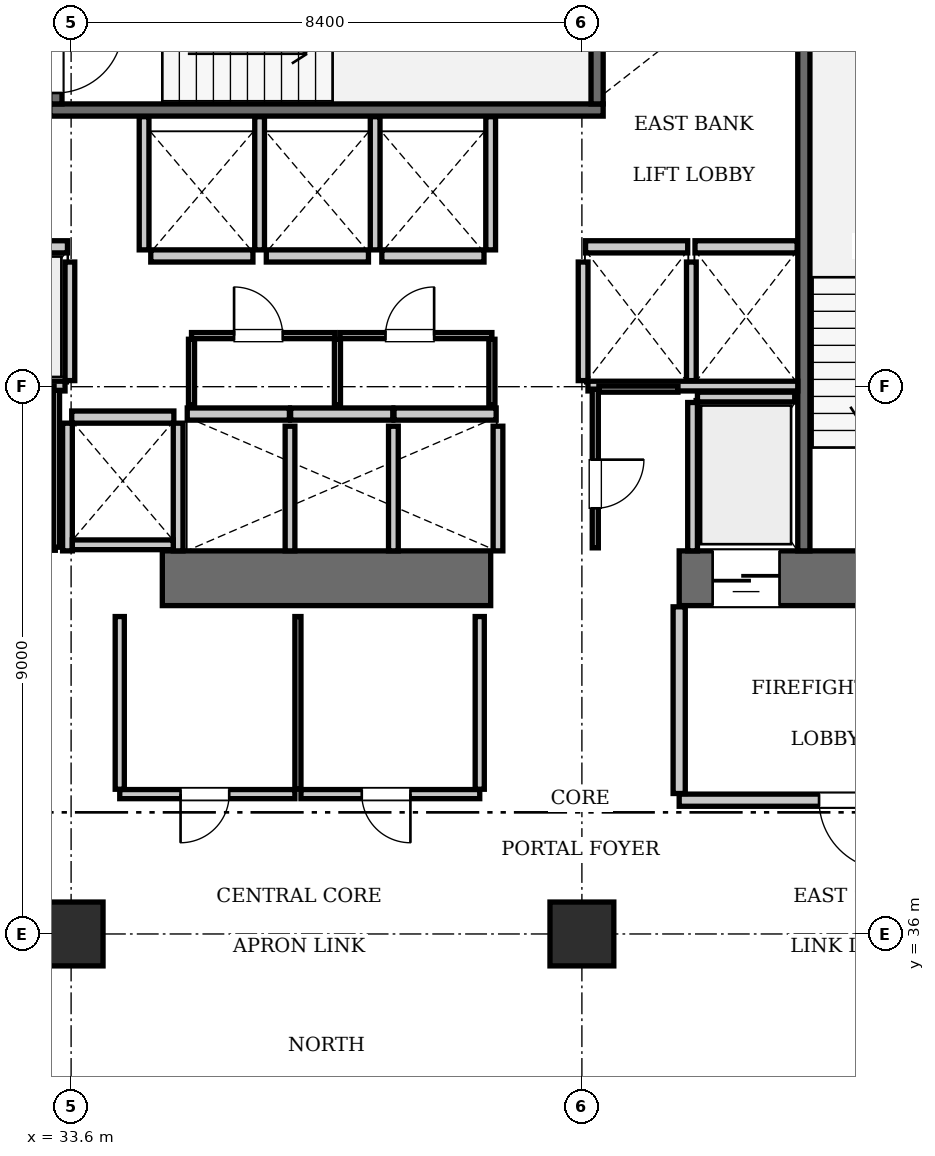
"""IFC4 building model, lengths in metres.
Left out: names, types, materials, properties, quantities, classifications, styles, units other than length and angle.
Written with IfcOpenShell. Run it as: python <this file> out.ifc"""

import sys

from ifc_helpers import new_model, si_unit, direction, frame, frame_2d, origin, origin_2d, place, context, subcontext, project, spatial, rectangle, extrude, element, fill, save


model = new_model("IFC4")
c1 = context("Model", 3, precision=1e-05, world=origin(), true_north=direction((0.0, 1.0)))
c2 = subcontext(c1, "Body", "Model", "MODEL_VIEW")
j1 = project(units=[si_unit("LENGTHUNIT", "METRE"), si_unit("PLANEANGLEUNIT", "RADIAN")], contexts=[c1])
p1 = place(None, origin())
s1 = spatial("IfcSite", under=j1, at=p1, CompositionType="ELEMENT")
p2 = place(p1, origin())
s2 = spatial("IfcBuilding", under=s1, at=p2, CompositionType="ELEMENT")
p3 = place(p2, frame((0.0, 0.0, 107.8)))
s3 = spatial("IfcBuildingStorey", under=s2, at=p3, CompositionType="ELEMENT", Elevation=107.8)
p4 = place(p3, frame((35.1, 41.85, 0.0), z_axis=(0.0, 0.0, 1.0), x_axis=(1.0, 0.0, 0.0)))
e1 = element("IfcWall", 1, at=p4, inside=s3, PredefinedType="SHEAR", context=c2, shape_type="SweptSolid", body=[
    extrude(rectangle(XDim=5.4, YDim=0.9, at=frame_2d((2.7, 0.0))), origin(), (0.0, 0.0, 1.0), 3.85),
])
p5 = place(p3, frame((43.6, 41.85, 0.0), z_axis=(0.0, 0.0, 1.0), x_axis=(1.0, 0.0, 0.0)))
e2 = element("IfcWall", 2, at=p5, inside=s3, PredefinedType="SHEAR", context=c2, shape_type="SweptSolid", body=[
    extrude(rectangle(XDim=6.8, YDim=0.9, at=frame_2d((3.4, 0.0))), origin(), (0.0, 0.0, 1.0), 3.85),
])
p6 = place(p5, frame((3.9, 0.0, 0.0)))
e3 = element("IfcOpeningElement", 3, at=p6, cuts=e2, PredefinedType="OPENING", context=c2, shape_type="SweptSolid", body=[
    extrude(rectangle(XDim=1.15, YDim=2.15, at=frame_2d((0.575, 1.075))), frame((0.0, 0.46, 0.0), z_axis=(0.0, -1.0, 0.0), x_axis=(1.0, 0.0, 0.0)), (0.0, 0.0, 1.0), 0.92),
])
p7 = place(p5, frame((0.55, 0.0, 0.0)))
e4 = element("IfcOpeningElement", 4, at=p7, cuts=e2, PredefinedType="OPENING", context=c2, shape_type="SweptSolid", body=[
    extrude(rectangle(XDim=1.1, YDim=2.2, at=frame_2d((0.55, 1.1))), frame((0.0, 0.46, 0.0), z_axis=(0.0, -1.0, 0.0), x_axis=(1.0, 0.0, 0.0)), (0.0, 0.0, 1.0), 0.92),
])
for number, where, z_axis, x_axis in (
    (5, (33.6, 36.0, 0.0), (0.0, 0.0, 1.0), (1.0, 0.0, 0.0)),
    (6, (42.0, 36.0, 0.0), (0.0, 0.0, 1.0), (1.0, 0.0, 0.0)),
):
    element("IfcColumn", number, at=place(p3, frame(where, z_axis=z_axis, x_axis=x_axis)), inside=s3, PredefinedType="COLUMN", context=c2, shape_type="SweptSolid", body=[
        extrude(rectangle(XDim=1.05, YDim=1.05, at=origin_2d()), origin(), (0.0, 0.0, 1.0), 3.85),
    ])
p8 = place(p3, frame((33.25, 49.55, 0.0), z_axis=(0.0, 0.0, 1.0), x_axis=(1.0, 0.0, 0.0)))
e7 = element("IfcWall", 7, at=p8, inside=s3, PredefinedType="SOLIDWALL", context=c2, shape_type="SweptSolid", body=[
    extrude(rectangle(XDim=9.1, YDim=0.2, at=frame_2d((4.55, 0.0))), origin(), (0.0, 0.0, 1.0), 3.61),
])
p9 = place(p3, frame((42.25, 49.65, 0.0), z_axis=(0.0, 0.0, 1.0), x_axis=(0.0, 1.0, 0.0)))
e8 = element("IfcWall", 8, at=p9, inside=s3, PredefinedType="SOLIDWALL", context=c2, shape_type="SweptSolid", body=[
    extrude(rectangle(XDim=3.45, YDim=0.2, at=frame_2d((1.725, 0.0))), origin(), (0.0, 0.0, 1.0), 3.61),
])
p10 = place(p3, frame((33.35, 49.65, 0.0), z_axis=(0.0, 0.0, 1.0), x_axis=(0.0, 1.0, 0.0)))
e9 = element("IfcWall", 9, at=p10, inside=s3, PredefinedType="SOLIDWALL", context=c2, shape_type="SweptSolid", body=[
    extrude(rectangle(XDim=3.45, YDim=0.2, at=frame_2d((1.725, 0.0))), origin(), (0.0, 0.0, 1.0), 3.61),
])
p11 = place(p10, frame((0.18, 0.0, 0.0)))
e10 = element("IfcOpeningElement", 10, at=p11, cuts=e9, PredefinedType="OPENING", context=c2, shape_type="SweptSolid", body=[
    extrude(rectangle(XDim=1.1, YDim=2.15, at=frame_2d((0.55, 1.075))), frame((0.0, 0.11, 0.0), z_axis=(0.0, -1.0, 0.0), x_axis=(1.0, 0.0, 0.0)), (0.0, 0.0, 1.0), 0.22),
])
p12 = place(p3, frame((45.65, 42.3, 0.0), z_axis=(0.0, 0.0, 1.0), x_axis=(0.0, 1.0, 0.0)))
e11 = element("IfcWall", 11, at=p12, inside=s3, PredefinedType="SOLIDWALL", context=c2, shape_type="SweptSolid", body=[
    extrude(rectangle(XDim=8.85, YDim=0.2, at=frame_2d((4.425, 0.0))), origin(), (0.0, 0.0, 1.0), 3.61),
])
p13 = place(p3, frame((31.86, 47.3, 0.0), z_axis=(0.0, 0.0, 1.0), x_axis=(1.0, 0.0, 0.0)))
e12 = element("IfcWall", 12, at=p13, inside=s3, PredefinedType="SOLIDWALL", context=c2, shape_type="SweptSolid", body=[
    extrude(rectangle(XDim=1.68, YDim=0.2, at=frame_2d((0.84, 0.0))), origin(), (0.0, 0.0, 1.0), 3.61),
])
p14 = place(p13, frame((0.34, 0.0, 0.0)))
e13 = element("IfcOpeningElement", 13, at=p14, cuts=e12, PredefinedType="OPENING", context=c2, shape_type="SweptSolid", body=[
    extrude(rectangle(XDim=1.0, YDim=2.15, at=frame_2d((0.5, 1.075))), frame((0.0, 0.11, 0.0), z_axis=(0.0, -1.0, 0.0), x_axis=(1.0, 0.0, 0.0)), (0.0, 0.0, 1.0), 0.22),
])
for number, where, z_axis, x_axis in (
    (14, (42.06, 47.3, 0.0), (0.0, 0.0, 1.0), (1.0, 0.0, 0.0)),
    (15, (43.86, 47.3, 0.0), (0.0, 0.0, 1.0), (1.0, 0.0, 0.0)),
    (16, (35.51, 44.55, 0.0), (0.0, 0.0, 1.0), (1.0, 0.0, 0.0)),
    (17, (37.21, 44.55, 0.0), (0.0, 0.0, 1.0), (1.0, 0.0, 0.0)),
):
    element("IfcWall", number, at=place(p3, frame(where, z_axis=z_axis, x_axis=x_axis)), inside=s3, PredefinedType="SOLIDWALL", context=c2, shape_type="SweptSolid", body=[
        extrude(rectangle(XDim=1.68, YDim=0.2, at=frame_2d((0.84, 0.0))), origin(), (0.0, 0.0, 1.0), 3.61),
    ])
for number, where, z_axis, x_axis in (
    (18, (38.91, 44.55, 0.0), (0.0, 0.0, 1.0), (1.0, 0.0, 0.0)),
    (19, (34.91, 47.15, 0.0), (0.0, 0.0, 1.0), (1.0, 0.0, 0.0)),
):
    element("IfcWall", number, at=place(p3, frame(where, z_axis=z_axis, x_axis=x_axis)), inside=s3, PredefinedType="SOLIDWALL", context=c2, shape_type="SweptSolid", body=[
        extrude(rectangle(XDim=1.68, YDim=0.2, at=frame_2d((0.84, 0.0))), origin(), (0.0, 0.0, 1.0), 3.61),
    ])
for number, where, z_axis, x_axis in (
    (20, (36.81, 47.15, 0.0), (0.0, 0.0, 1.0), (1.0, 0.0, 0.0)),
    (21, (38.71, 47.15, 0.0), (0.0, 0.0, 1.0), (1.0, 0.0, 0.0)),
    (22, (33.61, 44.5, 0.0), (0.0, 0.0, 1.0), (1.0, 0.0, 0.0)),
):
    element("IfcWall", number, at=place(p3, frame(where, z_axis=z_axis, x_axis=x_axis)), inside=s3, PredefinedType="SOLIDWALL", context=c2, shape_type="SweptSolid", body=[
        extrude(rectangle(XDim=1.68, YDim=0.2, at=frame_2d((0.84, 0.0))), origin(), (0.0, 0.0, 1.0), 3.61),
    ])
p15 = place(p3, frame((43.9, 44.83, 0.0), z_axis=(0.0, 0.0, 1.0), x_axis=(1.0, 0.0, 0.0)))
e23 = element("IfcWall", 23, at=p15, inside=s3, PredefinedType="SOLIDWALL", context=c2, shape_type="SweptSolid", body=[
    extrude(rectangle(XDim=1.6, YDim=0.16, at=frame_2d((0.8, 0.0))), origin(), (0.0, 0.0, 1.0), 3.61),
])
p16 = place(p3, frame((43.82, 42.3, 0.0), z_axis=(0.0, 0.0, 1.0), x_axis=(0.0, 1.0, 0.0)))
e24 = element("IfcWall", 24, at=p16, inside=s3, PredefinedType="SOLIDWALL", context=c2, shape_type="SweptSolid", body=[
    extrude(rectangle(XDim=2.44, YDim=0.16, at=frame_2d((1.22, 0.0))), origin(), (0.0, 0.0, 1.0), 3.61),
])
p17 = place(p3, frame((33.58, 45.1, 0.0), z_axis=(0.0, 0.0, 1.0), x_axis=(0.0, 1.0, 0.0)))
e25 = element("IfcWall", 25, at=p17, inside=s3, PredefinedType="SOLIDWALL", context=c2, shape_type="SweptSolid", body=[
    extrude(rectangle(XDim=1.95, YDim=0.16, at=frame_2d((0.975, 0.0))), origin(), (0.0, 0.0, 1.0), 3.61),
])
p18 = place(p3, frame((30.05, 45.01, 0.0), z_axis=(0.0, 0.0, 1.0), x_axis=(1.0, 0.0, 0.0)))
e26 = element("IfcWall", 26, at=p18, inside=s3, PredefinedType="SOLIDWALL", context=c2, shape_type="SweptSolid", body=[
    extrude(rectangle(XDim=3.45, YDim=0.16, at=frame_2d((1.725, 0.0))), origin(), (0.0, 0.0, 1.0), 3.61),
])
for number, where, z_axis, x_axis in (
    (27, (42.02, 45.1, 0.0), (0.0, 0.0, 1.0), (0.0, 1.0, 0.0)),
    (28, (43.8, 45.1, 0.0), (0.0, 0.0, 1.0), (0.0, 1.0, 0.0)),
):
    element("IfcWall", number, at=place(p3, frame(where, z_axis=z_axis, x_axis=x_axis)), inside=s3, PredefinedType="SOLIDWALL", context=c2, shape_type="SweptSolid", body=[
        extrude(rectangle(XDim=1.95, YDim=0.16, at=frame_2d((0.975, 0.0))), origin(), (0.0, 0.0, 1.0), 3.61),
    ])
p19 = place(p3, frame((42.1, 45.01, 0.0), z_axis=(0.0, 0.0, 1.0), x_axis=(1.0, 0.0, 0.0)))
e29 = element("IfcWall", 29, at=p19, inside=s3, PredefinedType="SOLIDWALL", context=c2, shape_type="SweptSolid", body=[
    extrude(rectangle(XDim=3.45, YDim=0.16, at=frame_2d((1.725, 0.0))), origin(), (0.0, 0.0, 1.0), 3.61),
])
for number, where, z_axis, x_axis in (
    (30, (37.2, 42.3, 0.0), (0.0, 0.0, 1.0), (0.0, 1.0, 0.0)),
    (31, (38.9, 42.3, 0.0), (0.0, 0.0, 1.0), (0.0, 1.0, 0.0)),
    (32, (40.62, 42.3, 0.0), (0.0, 0.0, 1.0), (0.0, 1.0, 0.0)),
):
    element("IfcWall", number, at=place(p3, frame(where, z_axis=z_axis, x_axis=x_axis)), inside=s3, PredefinedType="SOLIDWALL", context=c2, shape_type="SweptSolid", body=[
        extrude(rectangle(XDim=2.05, YDim=0.16, at=frame_2d((1.025, 0.0))), origin(), (0.0, 0.0, 1.0), 3.61),
    ])
for number, where, z_axis, x_axis in (
    (33, (34.8, 47.25, 0.0), (0.0, 0.0, 1.0), (0.0, 1.0, 0.0)),
    (34, (36.7, 47.25, 0.0), (0.0, 0.0, 1.0), (0.0, 1.0, 0.0)),
    (35, (38.6, 47.25, 0.0), (0.0, 0.0, 1.0), (0.0, 1.0, 0.0)),
    (36, (40.5, 47.25, 0.0), (0.0, 0.0, 1.0), (0.0, 1.0, 0.0)),
):
    element("IfcWall", number, at=place(p3, frame(where, z_axis=z_axis, x_axis=x_axis)), inside=s3, PredefinedType="SOLIDWALL", context=c2, shape_type="SweptSolid", body=[
        extrude(rectangle(XDim=2.19, YDim=0.16, at=frame_2d((1.095, 0.0))), origin(), (0.0, 0.0, 1.0), 3.61),
    ])
for number, where, z_axis, x_axis in (
    (37, (33.54, 42.3, 0.0), (0.0, 0.0, 1.0), (0.0, 1.0, 0.0)),
    (38, (35.36, 42.3, 0.0), (0.0, 0.0, 1.0), (0.0, 1.0, 0.0)),
):
    element("IfcWall", number, at=place(p3, frame(where, z_axis=z_axis, x_axis=x_axis)), inside=s3, PredefinedType="SOLIDWALL", context=c2, shape_type="SweptSolid", body=[
        extrude(rectangle(XDim=2.1, YDim=0.16, at=frame_2d((1.05, 0.0))), origin(), (0.0, 0.0, 1.0), 3.61),
    ])
p20 = place(p3, frame((33.62, 42.4, 0.0), z_axis=(0.0, 0.0, 1.0), x_axis=(1.0, 0.0, 0.0)))
e39 = element("IfcWall", 39, at=p20, inside=s3, PredefinedType="SOLIDWALL", context=c2, shape_type="SweptSolid", body=[
    extrude(rectangle(XDim=1.66, YDim=0.16, at=frame_2d((0.83, 0.0))), origin(), (0.0, 0.0, 1.0), 3.61),
])
p21 = place(p3, frame((43.6, 38.2, 0.0), z_axis=(0.0, 0.0, 1.0), x_axis=(1.0, 0.0, 0.0)))
e40 = element("IfcWall", 40, at=p21, inside=s3, PredefinedType="PARTITIONING", context=c2, shape_type="SweptSolid", body=[
    extrude(rectangle(XDim=5.8, YDim=0.2, at=frame_2d((2.9, 0.0))), origin(), (0.0, 0.0, 1.0), 3.61),
])
p22 = place(p21, frame((2.3, 0.0, 0.0)))
e41 = element("IfcOpeningElement", 41, at=p22, cuts=e40, PredefinedType="OPENING", context=c2, shape_type="SweptSolid", body=[
    extrude(rectangle(XDim=1.15, YDim=2.15, at=frame_2d((0.575, 1.075))), frame((0.0, 0.11, 0.0), z_axis=(0.0, -1.0, 0.0), x_axis=(1.0, 0.0, 0.0)), (0.0, 0.0, 1.0), 0.22),
])
p23 = place(p3, frame((43.6, 38.31, 0.0), z_axis=(0.0, 0.0, 1.0), x_axis=(0.0, 1.0, 0.0)))
e42 = element("IfcWall", 42, at=p23, inside=s3, PredefinedType="PARTITIONING", context=c2, shape_type="SweptSolid", body=[
    extrude(rectangle(XDim=3.07, YDim=0.2, at=frame_2d((1.535, 0.0))), origin(), (0.0, 0.0, 1.0), 3.61),
])
p24 = place(p3, frame((32.02, 42.36, 0.0), z_axis=(0.0, 0.0, 1.0), x_axis=(1.0, 0.0, 0.0)))
e43 = element("IfcWall", 43, at=p24, inside=s3, PredefinedType="PARTITIONING", context=c2, shape_type="SweptSolid", body=[
    extrude(rectangle(XDim=1.32, YDim=0.1, at=frame_2d((0.66, 0.0))), origin(), (0.0, 0.0, 1.0), 3.61),
])
p25 = place(p24, frame((0.24, 0.0, 0.0)))
e44 = element("IfcOpeningElement", 44, at=p25, cuts=e43, PredefinedType="OPENING", context=c2, shape_type="SweptSolid", body=[
    extrude(rectangle(XDim=0.8, YDim=2.05, at=frame_2d((0.4, 1.025))), frame((0.0, 0.06, 0.0), z_axis=(0.0, -1.0, 0.0), x_axis=(1.0, 0.0, 0.0)), (0.0, 0.0, 1.0), 0.12),
])
p26 = place(p3, frame((31.84, 44.96, 0.0), z_axis=(0.0, 0.0, 1.0), x_axis=(1.0, 0.0, 0.0)))
e45 = element("IfcWall", 45, at=p26, inside=s3, PredefinedType="PARTITIONING", context=c2, shape_type="SweptSolid", body=[
    extrude(rectangle(XDim=1.48, YDim=0.1, at=frame_2d((0.74, 0.0))), origin(), (0.0, 0.0, 1.0), 3.61),
])
p27 = place(p3, frame((33.36, 42.36, 0.0), z_axis=(0.0, 0.0, 1.0), x_axis=(0.0, 1.0, 0.0)))
e46 = element("IfcWall", 46, at=p27, inside=s3, PredefinedType="PARTITIONING", context=c2, shape_type="SweptSolid", body=[
    extrude(rectangle(XDim=2.58, YDim=0.1, at=frame_2d((1.29, 0.0))), origin(), (0.0, 0.0, 1.0), 3.61),
])
p28 = place(p3, frame((35.58, 45.84, 0.0), z_axis=(0.0, 0.0, 1.0), x_axis=(1.0, 0.0, 0.0)))
e47 = element("IfcWall", 47, at=p28, inside=s3, PredefinedType="PARTITIONING", context=c2, shape_type="SweptSolid", body=[
    extrude(rectangle(XDim=2.36, YDim=0.1, at=frame_2d((1.18, 0.0))), origin(), (0.0, 0.0, 1.0), 3.61),
])
p29 = place(p28, frame((0.7, 0.0, 0.0)))
e48 = element("IfcOpeningElement", 48, at=p29, cuts=e47, PredefinedType="OPENING", context=c2, shape_type="SweptSolid", body=[
    extrude(rectangle(XDim=0.8, YDim=2.05, at=frame_2d((0.4, 1.025))), frame((0.0, 0.06, 0.0), z_axis=(0.0, -1.0, 0.0), x_axis=(1.0, 0.0, 0.0)), (0.0, 0.0, 1.0), 0.12),
])
p30 = place(p3, frame((38.02, 45.84, 0.0), z_axis=(0.0, 0.0, 1.0), x_axis=(1.0, 0.0, 0.0)))
e49 = element("IfcWall", 49, at=p30, inside=s3, PredefinedType="PARTITIONING", context=c2, shape_type="SweptSolid", body=[
    extrude(rectangle(XDim=2.5, YDim=0.1, at=frame_2d((1.25, 0.0))), origin(), (0.0, 0.0, 1.0), 3.61),
])
p31 = place(p30, frame((0.75, 0.0, 0.0)))
e50 = element("IfcOpeningElement", 50, at=p31, cuts=e49, PredefinedType="OPENING", context=c2, shape_type="SweptSolid", body=[
    extrude(rectangle(XDim=0.8, YDim=2.05, at=frame_2d((0.4, 1.025))), frame((0.0, 0.06, 0.0), z_axis=(0.0, -1.0, 0.0), x_axis=(1.0, 0.0, 0.0)), (0.0, 0.0, 1.0), 0.12),
])
for number, where, z_axis, x_axis in (
    (51, (35.58, 44.7, 0.0), (0.0, 0.0, 1.0), (0.0, 1.0, 0.0)),
    (52, (37.98, 44.7, 0.0), (0.0, 0.0, 1.0), (0.0, 1.0, 0.0)),
    (53, (40.52, 44.7, 0.0), (0.0, 0.0, 1.0), (0.0, 1.0, 0.0)),
):
    element("IfcWall", number, at=place(p3, frame(where, z_axis=z_axis, x_axis=x_axis)), inside=s3, PredefinedType="PARTITIONING", context=c2, shape_type="SweptSolid", body=[
        extrude(rectangle(XDim=1.08, YDim=0.1, at=frame_2d((0.54, 0.0))), origin(), (0.0, 0.0, 1.0), 3.61),
    ])
p32 = place(p3, frame((42.22, 42.35, 0.0), z_axis=(0.0, 0.0, 1.0), x_axis=(0.0, 1.0, 0.0)))
e54 = element("IfcWall", 54, at=p32, inside=s3, PredefinedType="PARTITIONING", context=c2, shape_type="SweptSolid", body=[
    extrude(rectangle(XDim=2.61, YDim=0.1, at=frame_2d((1.305, 0.0))), origin(), (0.0, 0.0, 1.0), 3.61),
])
p33 = place(p32, frame((0.65, 0.0, 0.0)))
e55 = element("IfcOpeningElement", 55, at=p33, cuts=e54, PredefinedType="OPENING", context=c2, shape_type="SweptSolid", body=[
    extrude(rectangle(XDim=0.8, YDim=2.05, at=frame_2d((0.4, 1.025))), frame((0.0, 0.06, 0.0), z_axis=(0.0, -1.0, 0.0), x_axis=(1.0, 0.0, 0.0)), (0.0, 0.0, 1.0), 0.12),
])
p34 = place(p3, frame((42.28, 44.96, 0.0), z_axis=(0.0, 0.0, 1.0), x_axis=(1.0, 0.0, 0.0)))
e56 = element("IfcWall", 56, at=p34, inside=s3, PredefinedType="PARTITIONING", context=c2, shape_type="SweptSolid", body=[
    extrude(rectangle(XDim=1.3, YDim=0.1, at=frame_2d((0.65, 0.0))), origin(), (0.0, 0.0, 1.0), 3.61),
])
p35 = place(p3, frame((34.4, 38.3, 0.0), z_axis=(0.0, 0.0, 1.0), x_axis=(1.0, 0.0, 0.0)))
e57 = element("IfcWall", 57, at=p35, inside=s3, PredefinedType="PARTITIONING", context=c2, shape_type="SweptSolid", body=[
    extrude(rectangle(XDim=2.88, YDim=0.15, at=frame_2d((1.44, 0.0))), origin(), (0.0, 0.0, 1.0), 3.61),
])
p36 = place(p35, frame((1.0, 0.0, 0.0)))
e58 = element("IfcOpeningElement", 58, at=p36, cuts=e57, PredefinedType="OPENING", context=c2, shape_type="SweptSolid", body=[
    extrude(rectangle(XDim=0.8, YDim=2.05, at=frame_2d((0.4, 1.025))), frame((0.0, 0.085, 0.0), z_axis=(0.0, -1.0, 0.0), x_axis=(1.0, 0.0, 0.0)), (0.0, 0.0, 1.0), 0.17),
])
p37 = place(p3, frame((37.38, 38.3, 0.0), z_axis=(0.0, 0.0, 1.0), x_axis=(1.0, 0.0, 0.0)))
e59 = element("IfcWall", 59, at=p37, inside=s3, PredefinedType="PARTITIONING", context=c2, shape_type="SweptSolid", body=[
    extrude(rectangle(XDim=2.94, YDim=0.15, at=frame_2d((1.47, 0.0))), origin(), (0.0, 0.0, 1.0), 3.61),
])
p38 = place(p37, frame((1.0, 0.0, 0.0)))
e60 = element("IfcOpeningElement", 60, at=p38, cuts=e59, PredefinedType="OPENING", context=c2, shape_type="SweptSolid", body=[
    extrude(rectangle(XDim=0.8, YDim=2.05, at=frame_2d((0.4, 1.025))), frame((0.0, 0.085, 0.0), z_axis=(0.0, -1.0, 0.0), x_axis=(1.0, 0.0, 0.0)), (0.0, 0.0, 1.0), 0.17),
])
p39 = place(p3, frame((34.4, 38.38, 0.0), z_axis=(0.0, 0.0, 1.0), x_axis=(0.0, 1.0, 0.0)))
e61 = element("IfcWall", 61, at=p39, inside=s3, PredefinedType="PARTITIONING", context=c2, shape_type="SweptSolid", body=[
    extrude(rectangle(XDim=2.84, YDim=0.15, at=frame_2d((1.42, 0.0))), origin(), (0.0, 0.0, 1.0), 3.61),
])
p40 = place(p3, frame((37.33, 38.38, 0.0), z_axis=(0.0, 0.0, 1.0), x_axis=(0.0, 1.0, 0.0)))
e62 = element("IfcWall", 62, at=p40, inside=s3, PredefinedType="PARTITIONING", context=c2, shape_type="SweptSolid", body=[
    extrude(rectangle(XDim=2.84, YDim=0.1, at=frame_2d((1.42, 0.0))), origin(), (0.0, 0.0, 1.0), 3.61),
])
p41 = place(p3, frame((40.32, 38.38, 0.0), z_axis=(0.0, 0.0, 1.0), x_axis=(0.0, 1.0, 0.0)))
e63 = element("IfcWall", 63, at=p41, inside=s3, PredefinedType="PARTITIONING", context=c2, shape_type="SweptSolid", body=[
    extrude(rectangle(XDim=2.84, YDim=0.15, at=frame_2d((1.42, 0.0))), origin(), (0.0, 0.0, 1.0), 3.61),
])
p42 = place(p11, frame((1.1, 0.0, 0.0), z_axis=(0.0, 0.0, 1.0), x_axis=(-1.0, 0.0, 0.0)))
e64 = element("IfcDoor", 64, at=p42, inside=s3, OperationType="SINGLE_SWING_LEFT", PredefinedType="DOOR", context=c2, shape_type="SweptSolid", body=[
    extrude(rectangle(XDim=1.1, YDim=2.15, at=frame_2d((0.55, 1.075))), frame((0.0, 0.025, 0.0), z_axis=(0.0, -1.0, 0.0), x_axis=(1.0, 0.0, 0.0)), (0.0, 0.0, 1.0), 0.05),
])
fill(e10, e64)
p43 = place(p7, frame((1.1, 0.0, 0.0), z_axis=(0.0, 0.0, 1.0), x_axis=(-1.0, 0.0, 0.0)))
e65 = element("IfcDoor", 65, at=p43, inside=s3, OperationType="SLIDING_TO_LEFT", PredefinedType="DOOR", context=c2, shape_type="SweptSolid", body=[
    extrude(rectangle(XDim=1.1, YDim=2.2, at=frame_2d((0.55, 1.1))), frame((0.0, 0.025, 0.0), z_axis=(0.0, -1.0, 0.0), x_axis=(1.0, 0.0, 0.0)), (0.0, 0.0, 1.0), 0.05),
])
fill(e4, e65)
p44 = place(p22, frame((1.15, 0.0, 0.0), z_axis=(0.0, 0.0, 1.0), x_axis=(-1.0, 0.0, 0.0)))
e66 = element("IfcDoor", 66, at=p44, inside=s3, OperationType="SINGLE_SWING_LEFT", PredefinedType="DOOR", context=c2, shape_type="SweptSolid", body=[
    extrude(rectangle(XDim=1.15, YDim=2.15, at=frame_2d((0.575, 1.075))), frame((0.0, 0.025, 0.0), z_axis=(0.0, -1.0, 0.0), x_axis=(1.0, 0.0, 0.0)), (0.0, 0.0, 1.0), 0.05),
])
fill(e41, e66)
p45 = place(p29, origin())
e67 = element("IfcDoor", 67, at=p45, inside=s3, OperationType="SINGLE_SWING_LEFT", PredefinedType="DOOR", context=c2, shape_type="SweptSolid", body=[
    extrude(rectangle(XDim=0.8, YDim=2.05, at=frame_2d((0.4, 1.025))), frame((0.0, 0.025, 0.0), z_axis=(0.0, -1.0, 0.0), x_axis=(1.0, 0.0, 0.0)), (0.0, 0.0, 1.0), 0.05),
])
fill(e48, e67)
p46 = place(p31, origin())
e68 = element("IfcDoor", 68, at=p46, inside=s3, OperationType="SINGLE_SWING_RIGHT", PredefinedType="DOOR", context=c2, shape_type="SweptSolid", body=[
    extrude(rectangle(XDim=0.8, YDim=2.05, at=frame_2d((0.4, 1.025))), frame((0.0, 0.025, 0.0), z_axis=(0.0, -1.0, 0.0), x_axis=(1.0, 0.0, 0.0)), (0.0, 0.0, 1.0), 0.05),
])
fill(e50, e68)
p47 = place(p33, frame((0.8, 0.0, 0.0), z_axis=(0.0, 0.0, 1.0), x_axis=(-1.0, 0.0, 0.0)))
e69 = element("IfcDoor", 69, at=p47, inside=s3, OperationType="SINGLE_SWING_LEFT", PredefinedType="DOOR", context=c2, shape_type="SweptSolid", body=[
    extrude(rectangle(XDim=0.8, YDim=2.05, at=frame_2d((0.4, 1.025))), frame((0.0, 0.025, 0.0), z_axis=(0.0, -1.0, 0.0), x_axis=(1.0, 0.0, 0.0)), (0.0, 0.0, 1.0), 0.05),
])
fill(e55, e69)
p48 = place(p36, frame((0.8, 0.0, 0.0), z_axis=(0.0, 0.0, 1.0), x_axis=(-1.0, 0.0, 0.0)))
e70 = element("IfcDoor", 70, at=p48, inside=s3, OperationType="SINGLE_SWING_RIGHT", PredefinedType="DOOR", context=c2, shape_type="SweptSolid", body=[
    extrude(rectangle(XDim=0.8, YDim=2.05, at=frame_2d((0.4, 1.025))), frame((0.0, 0.025, 0.0), z_axis=(0.0, -1.0, 0.0), x_axis=(1.0, 0.0, 0.0)), (0.0, 0.0, 1.0), 0.05),
])
fill(e58, e70)
p49 = place(p38, frame((0.8, 0.0, 0.0), z_axis=(0.0, 0.0, 1.0), x_axis=(-1.0, 0.0, 0.0)))
e71 = element("IfcDoor", 71, at=p49, inside=s3, OperationType="SINGLE_SWING_LEFT", PredefinedType="DOOR", context=c2, shape_type="SweptSolid", body=[
    extrude(rectangle(XDim=0.8, YDim=2.05, at=frame_2d((0.4, 1.025))), frame((0.0, 0.025, 0.0), z_axis=(0.0, -1.0, 0.0), x_axis=(1.0, 0.0, 0.0)), (0.0, 0.0, 1.0), 0.05),
])
fill(e60, e71)
save(model, sys.argv[1])
